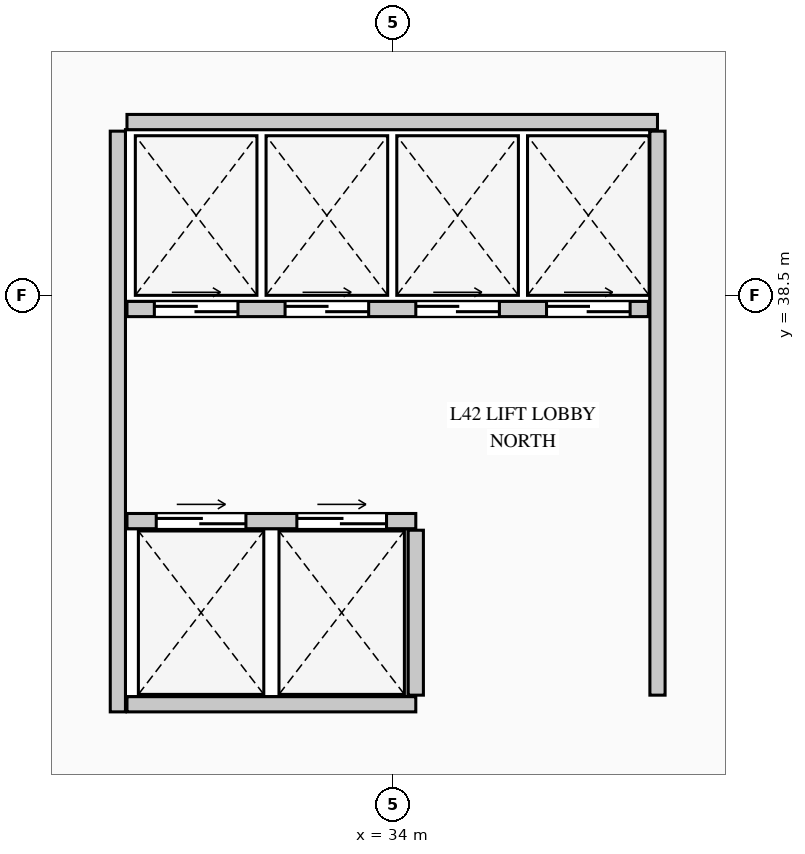
"""IFC4 building model, lengths in metres.
Left out: names, types, materials, properties, quantities, classifications, styles, units other than length and angle.
Written with IfcOpenShell. Run it as: python <this file> out.ifc"""

import sys

from ifc_helpers import new_model, si_unit, direction, frame, frame_2d, origin, place, context, subcontext, project, spatial, rectangle, extrude, element, fill, save


model = new_model("IFC4")
c1 = context("Model", 3, precision=1e-05, world=origin(), true_north=direction((0.0, 1.0)))
c2 = subcontext(c1, "Body", "Model", "MODEL_VIEW")
j1 = project(units=[si_unit("LENGTHUNIT", "METRE"), si_unit("PLANEANGLEUNIT", "RADIAN")], contexts=[c1])
p1 = place(None, origin())
s1 = spatial("IfcSite", under=j1, at=p1, CompositionType="ELEMENT")
p2 = place(p1, origin())
s2 = spatial("IfcBuilding", under=s1, at=p2, CompositionType="ELEMENT")
p3 = place(p2, frame((0.0, 0.0, 178.55)))
s3 = spatial("IfcBuildingStorey", under=s2, at=p3, CompositionType="ELEMENT", Elevation=178.55)
p4 = place(p3, frame((30.38, 33.02, 0.0), z_axis=(0.0, 0.0, 1.0), x_axis=(0.0, 1.0, 0.0)))
e1 = element("IfcWall", 1, at=p4, inside=s3, PredefinedType="PARTITIONING", context=c2, shape_type="SweptSolid", body=[
    extrude(rectangle(XDim=7.64, YDim=0.2, at=frame_2d((3.82, 0.0))), origin(), (0.0, 0.0, 1.0), 4.95),
])
p5 = place(p3, frame((30.5, 40.78, 0.0), z_axis=(0.0, 0.0, 1.0), x_axis=(1.0, 0.0, 0.0)))
e2 = element("IfcWall", 2, at=p5, inside=s3, PredefinedType="PARTITIONING", context=c2, shape_type="SweptSolid", body=[
    extrude(rectangle(XDim=6.98, YDim=0.2, at=frame_2d((3.49, 0.0))), origin(), (0.0, 0.0, 1.0), 4.95),
])
p6 = place(p3, frame((37.48, 33.24, 0.0), z_axis=(0.0, 0.0, 1.0), x_axis=(0.0, 1.0, 0.0)))
e3 = element("IfcWall", 3, at=p6, inside=s3, PredefinedType="PARTITIONING", context=c2, shape_type="SweptSolid", body=[
    extrude(rectangle(XDim=7.42, YDim=0.2, at=frame_2d((3.71, 0.0))), origin(), (0.0, 0.0, 1.0), 4.95),
])
p7 = place(p3, frame((30.5, 38.32, 0.0), z_axis=(0.0, 0.0, 1.0), x_axis=(1.0, 0.0, 0.0)))
e4 = element("IfcWall", 4, at=p7, inside=s3, PredefinedType="PARTITIONING", context=c2, shape_type="SweptSolid", body=[
    extrude(rectangle(XDim=6.86, YDim=0.2, at=frame_2d((3.43, 0.0))), origin(), (0.0, 0.0, 1.0), 4.95),
])
p8 = place(p7, frame((0.36, 0.0, 0.0)))
e5 = element("IfcOpeningElement", 5, at=p8, cuts=e4, PredefinedType="OPENING", context=c2, shape_type="SweptSolid", body=[
    extrude(rectangle(XDim=1.1, YDim=2.2, at=frame_2d((0.55, 1.1))), frame((0.0, 0.11, 0.0), z_axis=(0.0, -1.0, 0.0), x_axis=(1.0, 0.0, 0.0)), (0.0, 0.0, 1.0), 0.22),
])
p9 = place(p7, frame((2.08, 0.0, 0.0)))
e6 = element("IfcOpeningElement", 6, at=p9, cuts=e4, PredefinedType="OPENING", context=c2, shape_type="SweptSolid", body=[
    extrude(rectangle(XDim=1.1, YDim=2.2, at=frame_2d((0.55, 1.1))), frame((0.0, 0.11, 0.0), z_axis=(0.0, -1.0, 0.0), x_axis=(1.0, 0.0, 0.0)), (0.0, 0.0, 1.0), 0.22),
])
p10 = place(p7, frame((3.8, 0.0, 0.0)))
e7 = element("IfcOpeningElement", 7, at=p10, cuts=e4, PredefinedType="OPENING", context=c2, shape_type="SweptSolid", body=[
    extrude(rectangle(XDim=1.1, YDim=2.2, at=frame_2d((0.55, 1.1))), frame((0.0, 0.11, 0.0), z_axis=(0.0, -1.0, 0.0), x_axis=(1.0, 0.0, 0.0)), (0.0, 0.0, 1.0), 0.22),
])
p11 = place(p7, frame((5.52, 0.0, 0.0)))
e8 = element("IfcOpeningElement", 8, at=p11, cuts=e4, PredefinedType="OPENING", context=c2, shape_type="SweptSolid", body=[
    extrude(rectangle(XDim=1.1, YDim=2.2, at=frame_2d((0.55, 1.1))), frame((0.0, 0.11, 0.0), z_axis=(0.0, -1.0, 0.0), x_axis=(1.0, 0.0, 0.0)), (0.0, 0.0, 1.0), 0.22),
])
p12 = place(p3, frame((30.5, 35.53, 0.0), z_axis=(0.0, 0.0, 1.0), x_axis=(1.0, 0.0, 0.0)))
e9 = element("IfcWall", 9, at=p12, inside=s3, PredefinedType="PARTITIONING", context=c2, shape_type="SweptSolid", body=[
    extrude(rectangle(XDim=3.8, YDim=0.2, at=frame_2d((1.9, 0.0))), origin(), (0.0, 0.0, 1.0), 4.95),
])
p13 = place(p12, frame((0.385, 0.0, 0.0)))
e10 = element("IfcOpeningElement", 10, at=p13, cuts=e9, PredefinedType="OPENING", context=c2, shape_type="SweptSolid", body=[
    extrude(rectangle(XDim=1.18, YDim=2.25, at=frame_2d((0.59, 1.125))), frame((0.0, 0.11, 0.0), z_axis=(0.0, -1.0, 0.0), x_axis=(1.0, 0.0, 0.0)), (0.0, 0.0, 1.0), 0.22),
])
p14 = place(p12, frame((2.235, 0.0, 0.0)))
e11 = element("IfcOpeningElement", 11, at=p14, cuts=e9, PredefinedType="OPENING", context=c2, shape_type="SweptSolid", body=[
    extrude(rectangle(XDim=1.18, YDim=2.25, at=frame_2d((0.59, 1.125))), frame((0.0, 0.11, 0.0), z_axis=(0.0, -1.0, 0.0), x_axis=(1.0, 0.0, 0.0)), (0.0, 0.0, 1.0), 0.22),
])
p15 = place(p3, frame((30.5, 33.12, 0.0), z_axis=(0.0, 0.0, 1.0), x_axis=(1.0, 0.0, 0.0)))
e12 = element("IfcWall", 12, at=p15, inside=s3, PredefinedType="PARTITIONING", context=c2, shape_type="SweptSolid", body=[
    extrude(rectangle(XDim=3.8, YDim=0.2, at=frame_2d((1.9, 0.0))), origin(), (0.0, 0.0, 1.0), 4.95),
])
p16 = place(p3, frame((34.3, 33.24, 0.0), z_axis=(0.0, 0.0, 1.0), x_axis=(0.0, 1.0, 0.0)))
e13 = element("IfcWall", 13, at=p16, inside=s3, PredefinedType="PARTITIONING", context=c2, shape_type="SweptSolid", body=[
    extrude(rectangle(XDim=2.17, YDim=0.2, at=frame_2d((1.085, 0.0))), origin(), (0.0, 0.0, 1.0), 4.95),
])
p17 = place(p8, origin())
e14 = element("IfcDoor", 14, at=p17, inside=s3, OperationType="DOUBLE_DOOR_SLIDING", PredefinedType="DOOR", context=c2, shape_type="SweptSolid", body=[
    extrude(rectangle(XDim=1.1, YDim=2.2, at=frame_2d((0.55, 1.1))), frame((0.0, 0.025, 0.0), z_axis=(0.0, -1.0, 0.0), x_axis=(1.0, 0.0, 0.0)), (0.0, 0.0, 1.0), 0.05),
])
fill(e5, e14)
p18 = place(p9, origin())
e15 = element("IfcDoor", 15, at=p18, inside=s3, OperationType="DOUBLE_DOOR_SLIDING", PredefinedType="DOOR", context=c2, shape_type="SweptSolid", body=[
    extrude(rectangle(XDim=1.1, YDim=2.2, at=frame_2d((0.55, 1.1))), frame((0.0, 0.025, 0.0), z_axis=(0.0, -1.0, 0.0), x_axis=(1.0, 0.0, 0.0)), (0.0, 0.0, 1.0), 0.05),
])
fill(e6, e15)
p19 = place(p10, origin())
e16 = element("IfcDoor", 16, at=p19, inside=s3, OperationType="DOUBLE_DOOR_SLIDING", PredefinedType="DOOR", context=c2, shape_type="SweptSolid", body=[
    extrude(rectangle(XDim=1.1, YDim=2.2, at=frame_2d((0.55, 1.1))), frame((0.0, 0.025, 0.0), z_axis=(0.0, -1.0, 0.0), x_axis=(1.0, 0.0, 0.0)), (0.0, 0.0, 1.0), 0.05),
])
fill(e7, e16)
p20 = place(p11, origin())
e17 = element("IfcDoor", 17, at=p20, inside=s3, OperationType="DOUBLE_DOOR_SLIDING", PredefinedType="DOOR", context=c2, shape_type="SweptSolid", body=[
    extrude(rectangle(XDim=1.1, YDim=2.2, at=frame_2d((0.55, 1.1))), frame((0.0, 0.025, 0.0), z_axis=(0.0, -1.0, 0.0), x_axis=(1.0, 0.0, 0.0)), (0.0, 0.0, 1.0), 0.05),
])
fill(e8, e17)
p21 = place(p13, origin())
e18 = element("IfcDoor", 18, at=p21, inside=s3, OperationType="DOUBLE_DOOR_SLIDING", PredefinedType="DOOR", context=c2, shape_type="SweptSolid", body=[
    extrude(rectangle(XDim=1.18, YDim=2.25, at=frame_2d((0.59, 1.125))), frame((0.0, 0.025, 0.0), z_axis=(0.0, -1.0, 0.0), x_axis=(1.0, 0.0, 0.0)), (0.0, 0.0, 1.0), 0.05),
])
fill(e10, e18)
p22 = place(p14, origin())
e19 = element("IfcDoor", 19, at=p22, inside=s3, OperationType="DOUBLE_DOOR_SLIDING", PredefinedType="DOOR", context=c2, shape_type="SweptSolid", body=[
    extrude(rectangle(XDim=1.18, YDim=2.25, at=frame_2d((0.59, 1.125))), frame((0.0, 0.025, 0.0), z_axis=(0.0, -1.0, 0.0), x_axis=(1.0, 0.0, 0.0)), (0.0, 0.0, 1.0), 0.05),
])
fill(e11, e19)
save(model, sys.argv[1])
